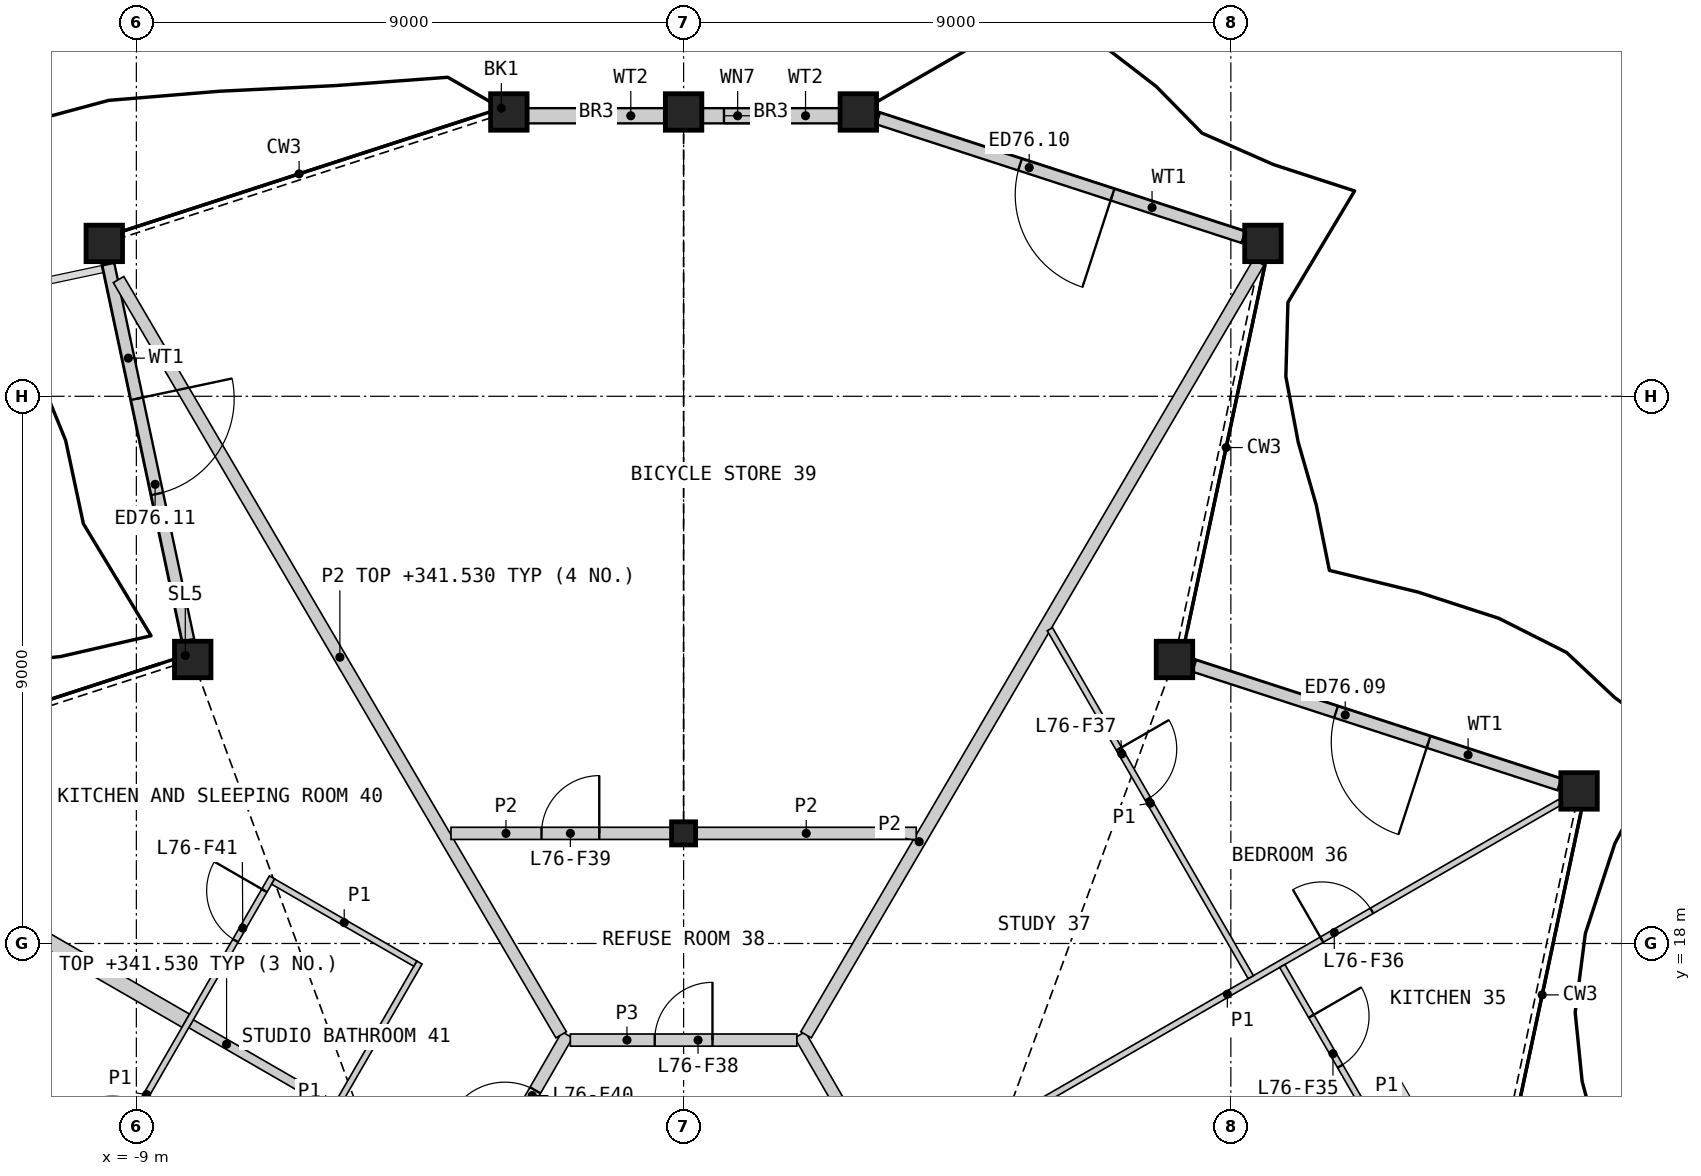
"""IFC4 building model, lengths in metres.
Left out: names, types, materials, properties, quantities, classifications, styles, units other than length and angle.
Written with IfcOpenShell. Run it as: python <this file> out.ifc"""

import sys

from ifc_helpers import new_model, si_unit, direction, frame, frame_2d, origin, origin_2d, place, context, subcontext, project, spatial, rectangle, hollow_rectangle, i_section, extrude, element, fill, save


model = new_model("IFC4")
c1 = context("Model", 3, precision=1e-05, world=origin(), true_north=direction((0.0, 1.0)))
c2 = subcontext(c1, "Body", "Model", "MODEL_VIEW")
j1 = project(units=[si_unit("LENGTHUNIT", "METRE"), si_unit("PLANEANGLEUNIT", "RADIAN")], contexts=[c1])
p1 = place(None, origin())
s1 = spatial("IfcSite", under=j1, at=p1, CompositionType="ELEMENT")
p2 = place(p1, origin())
s2 = spatial("IfcBuilding", under=s1, at=p2, CompositionType="ELEMENT")
p3 = place(p2, frame((0.0, 0.0, 339.2)))
s3 = spatial("IfcBuildingStorey", under=s2, at=p3, CompositionType="ELEMENT", Elevation=339.2)
for number, where, z_axis, x_axis in (
    (1, (14.727, 20.509, 0.0), (0.0, 0.0, 1.0), (1.0, 0.0, 0.0)),
    (2, (8.073, 22.671, 0.0), (0.0, 0.0, 1.0), (1.0, 0.0, 0.0)),
    (3, (9.527, 29.514, 0.0), (0.0, 0.0, 1.0), (1.0, 0.0, 0.0)),
    (4, (2.874, 31.676, 0.0), (0.0, 0.0, 1.0), (1.0, 0.0, 0.0)),
    (5, (0.0, 31.676, 0.0), (0.0, 0.0, 1.0), (1.0, 0.0, 0.0)),
    (6, (-2.874, 31.676, 0.0), (0.0, 0.0, 1.0), (1.0, 0.0, 0.0)),
    (7, (-9.527, 29.514, 0.0), (0.0, 0.0, 1.0), (1.0, 0.0, 0.0)),
    (8, (-8.073, 22.671, 0.0), (0.0, 0.0, 1.0), (1.0, 0.0, 0.0)),
):
    element("IfcColumn", number, at=place(p3, frame(where, z_axis=z_axis, x_axis=x_axis)), inside=s3, PredefinedType="COLUMN", context=c2, shape_type="SweptSolid", body=[
        extrude(hollow_rectangle(XDim=0.6, YDim=0.6, WallThickness=0.04, at=origin_2d()), origin(), (0.0, 0.0, 1.0), 3.4),
    ])
p4 = place(p3, frame((0.0, 19.811, 0.0), z_axis=(0.0, 0.0, 1.0), x_axis=(1.0, 0.0, 0.0)))
e9 = element("IfcColumn", 9, at=p4, inside=s3, PredefinedType="COLUMN", context=c2, shape_type="SweptSolid", body=[
    extrude(i_section(OverallWidth=0.396, OverallDepth=0.381, WebThickness=0.019, FlangeThickness=0.03, at=origin_2d()), origin(), (0.0, 0.0, 1.0), 3.4),
])
p5 = place(p3, frame((14.403, 20.614, 0.0), z_axis=(0.0, 0.0, 1.0), x_axis=(-0.951053103012, 0.309027499182, 0.0)))
e10 = element("IfcWall", 10, at=p5, inside=s3, PredefinedType="SOLIDWALL", context=c2, shape_type="SweptSolid", body=[
    extrude(rectangle(XDim=6.315, YDim=0.2, at=frame_2d((3.157, 0.0))), origin(), (0.0, 0.0, 1.0), 2.488),
])
p6 = place(p5, frame((2.263, 0.0, 0.0)))
e11 = element("IfcOpeningElement", 11, at=p6, cuts=e10, PredefinedType="OPENING", context=c2, shape_type="SweptSolid", body=[
    extrude(rectangle(XDim=1.6, YDim=2.25, at=frame_2d((0.8, 1.125))), frame((0.0, 0.11, 0.0), z_axis=(0.0, -1.0, 0.0), x_axis=(1.0, 0.0, 0.0)), (0.0, 0.0, 1.0), 0.22),
])
p7 = place(p3, frame((9.206, 29.616, 0.0), z_axis=(0.0, 0.0, 1.0), x_axis=(-0.951056221468, 0.309017901757, 0.0)))
e12 = element("IfcWall", 12, at=p7, inside=s3, PredefinedType="SOLIDWALL", context=c2, shape_type="SweptSolid", body=[
    extrude(rectangle(XDim=6.316, YDim=0.2, at=frame_2d((3.158, 0.0))), origin(), (0.0, 0.0, 1.0), 2.488),
])
p8 = place(p7, frame((2.263, 0.0, 0.0)))
e13 = element("IfcOpeningElement", 13, at=p8, cuts=e12, PredefinedType="OPENING", context=c2, shape_type="SweptSolid", body=[
    extrude(rectangle(XDim=1.6, YDim=2.25, at=frame_2d((0.8, 1.125))), frame((0.0, 0.11, 0.0), z_axis=(0.0, -1.0, 0.0), x_axis=(1.0, 0.0, 0.0)), (0.0, 0.0, 1.0), 0.22),
])
p9 = place(p3, frame((2.574, 31.614, 0.0), z_axis=(0.0, 0.0, 1.0), x_axis=(-1.0, 0.0, 0.0)))
e14 = element("IfcWall", 14, at=p9, inside=s3, PredefinedType="SOLIDWALL", context=c2, shape_type="SweptSolid", body=[
    extrude(rectangle(XDim=2.274, YDim=0.25, at=frame_2d((1.137, 0.0))), origin(), (0.0, 0.0, 1.0), 2.488),
])
p10 = place(p9, frame((1.01, 0.0, 1.6)))
e15 = element("IfcOpeningElement", 15, at=p10, cuts=e14, PredefinedType="OPENING", context=c2, shape_type="SweptSolid", body=[
    extrude(rectangle(XDim=0.9, YDim=0.6, at=frame_2d((0.45, 0.3))), frame((0.0, 0.135, 0.0), z_axis=(0.0, -1.0, 0.0), x_axis=(1.0, 0.0, 0.0)), (0.0, 0.0, 1.0), 0.27),
])
p11 = place(p3, frame((-0.3, 31.614, 0.0), z_axis=(0.0, 0.0, 1.0), x_axis=(-1.0, 0.0, 0.0)))
e16 = element("IfcWall", 16, at=p11, inside=s3, PredefinedType="SOLIDWALL", context=c2, shape_type="SweptSolid", body=[
    extrude(rectangle(XDim=2.274, YDim=0.25, at=frame_2d((1.137, 0.0))), origin(), (0.0, 0.0, 1.0), 2.488),
])
p12 = place(p3, frame((-9.461, 29.174, 0.0), z_axis=(0.0, 0.0, 1.0), x_axis=(0.20791277238, -0.97814737084, 0.0)))
e17 = element("IfcWall", 17, at=p12, inside=s3, PredefinedType="SOLIDWALL", context=c2, shape_type="SweptSolid", body=[
    extrude(rectangle(XDim=6.324, YDim=0.2, at=frame_2d((3.162, 0.0))), origin(), (0.0, 0.0, 1.0), 2.488),
])
p13 = place(p12, frame((2.263, 0.0, 0.0)))
e18 = element("IfcOpeningElement", 18, at=p13, cuts=e17, PredefinedType="OPENING", context=c2, shape_type="SweptSolid", body=[
    extrude(rectangle(XDim=1.6, YDim=2.25, at=frame_2d((0.8, 1.125))), frame((0.0, 0.11, 0.0), z_axis=(0.0, -1.0, 0.0), x_axis=(1.0, 0.0, 0.0)), (0.0, 0.0, 1.0), 0.22),
])
p14 = place(p3, frame((-14.417, 20.327, 0.0), z_axis=(0.0, 0.0, 1.0), x_axis=(0.866018271907, -0.50001235257, 0.0)))
e19 = element("IfcWall", 19, at=p14, inside=s3, PredefinedType="PARTITIONING", context=c2, shape_type="SweptSolid", body=[
    extrude(rectangle(XDim=7.193, YDim=0.25, at=frame_2d((3.596, 0.0))), origin(), (0.0, 0.0, 1.0), 2.33),
])
p15 = place(p3, frame((-4.169, 12.59, 0.0), z_axis=(0.0, 0.0, 1.0), x_axis=(0.499950370306, 0.866054055606, 0.0)))
e20 = element("IfcWall", 20, at=p15, inside=s3, PredefinedType="PARTITIONING", context=c2, shape_type="SweptSolid", body=[
    extrude(rectangle(XDim=4.513, YDim=0.2, at=frame_2d((2.256, 0.0))), origin(), (0.0, 0.0, 1.0), 3.1),
])
p16 = place(p15, frame((2.459, 0.0, 0.0)))
e21 = element("IfcOpeningElement", 21, at=p16, cuts=e20, PredefinedType="OPENING", context=c2, shape_type="SweptSolid", body=[
    extrude(rectangle(XDim=1.0, YDim=2.1, at=frame_2d((0.5, 1.05))), frame((0.0, 0.11, 0.0), z_axis=(0.0, -1.0, 0.0), x_axis=(1.0, 0.0, 0.0)), (0.0, 0.0, 1.0), 0.22),
])
p17 = place(p3, frame((1.913, 16.498, 0.0), z_axis=(0.0, 0.0, 1.0), x_axis=(0.499950370306, -0.866054055606, 0.0)))
e22 = element("IfcWall", 22, at=p17, inside=s3, PredefinedType="PARTITIONING", context=c2, shape_type="SweptSolid", body=[
    extrude(rectangle(XDim=4.513, YDim=0.2, at=frame_2d((2.256, 0.0))), origin(), (0.0, 0.0, 1.0), 3.1),
])
p18 = place(p3, frame((-1.863, 16.411, 0.0), z_axis=(0.0, 0.0, 1.0), x_axis=(1.0, 0.0, 0.0)))
e23 = element("IfcWall", 23, at=p18, inside=s3, PredefinedType="PARTITIONING", context=c2, shape_type="SweptSolid", body=[
    extrude(rectangle(XDim=3.726, YDim=0.2, at=frame_2d((1.863, 0.0))), origin(), (0.0, 0.0, 1.0), 3.1),
])
p19 = place(p18, frame((1.388, 0.0, 0.0)))
e24 = element("IfcOpeningElement", 24, at=p19, cuts=e23, PredefinedType="OPENING", context=c2, shape_type="SweptSolid", body=[
    extrude(rectangle(XDim=0.95, YDim=2.1, at=frame_2d((0.475, 1.05))), frame((0.0, 0.11, 0.0), z_axis=(0.0, -1.0, 0.0), x_axis=(1.0, 0.0, 0.0)), (0.0, 0.0, 1.0), 0.22),
])
p20 = place(p3, frame((-9.292, 28.919, 0.0), z_axis=(0.0, 0.0, 1.0), x_axis=(0.505558038556, -0.862792599442, 0.0)))
e25 = element("IfcWall", 25, at=p20, inside=s3, PredefinedType="PARTITIONING", context=c2, shape_type="SweptSolid", body=[
    extrude(rectangle(XDim=14.397, YDim=0.2, at=frame_2d((7.199, 0.0))), origin(), (0.0, 0.0, 1.0), 2.33),
])
p21 = place(p3, frame((2.014, 16.497, 0.0), z_axis=(0.0, 0.0, 1.0), x_axis=(0.5055676136, 0.862786988821, 0.0)))
e26 = element("IfcWall", 26, at=p21, inside=s3, PredefinedType="PARTITIONING", context=c2, shape_type="SweptSolid", body=[
    extrude(rectangle(XDim=14.728, YDim=0.2, at=frame_2d((7.364, 0.0))), origin(), (0.0, 0.0, 1.0), 2.33),
])
p22 = place(p3, frame((-3.826, 19.811, 0.0), z_axis=(0.0, 0.0, 1.0), x_axis=(1.0, 0.0, 0.0)))
e27 = element("IfcWall", 27, at=p22, inside=s3, PredefinedType="PARTITIONING", context=c2, shape_type="SweptSolid", body=[
    extrude(rectangle(XDim=3.618, YDim=0.2, at=frame_2d((1.809, 0.0))), origin(), (0.0, 0.0, 1.0), 2.33),
])
p23 = place(p22, frame((1.489, 0.0, 0.0)))
e28 = element("IfcOpeningElement", 28, at=p23, cuts=e27, PredefinedType="OPENING", context=c2, shape_type="SweptSolid", body=[
    extrude(rectangle(XDim=0.95, YDim=2.1, at=frame_2d((0.475, 1.05))), frame((0.0, 0.11, 0.0), z_axis=(0.0, -1.0, 0.0), x_axis=(1.0, 0.0, 0.0)), (0.0, 0.0, 1.0), 0.22),
])
p24 = place(p3, frame((0.208, 19.811, 0.0), z_axis=(0.0, 0.0, 1.0), x_axis=(1.0, 0.0, 0.0)))
e29 = element("IfcWall", 29, at=p24, inside=s3, PredefinedType="PARTITIONING", context=c2, shape_type="SweptSolid", body=[
    extrude(rectangle(XDim=3.618, YDim=0.2, at=frame_2d((1.809, 0.0))), origin(), (0.0, 0.0, 1.0), 2.33),
])
p25 = place(p3, frame((-8.101, 16.68, 0.0), z_axis=(0.0, 0.0, 1.0), x_axis=(0.866019956843, -0.50000943426, 0.0)))
e30 = element("IfcWall", 30, at=p25, inside=s3, PredefinedType="PLUMBINGWALL", context=c2, shape_type="SweptSolid", body=[
    extrude(rectangle(XDim=2.7, YDim=0.15, at=frame_2d((1.35, 0.0))), origin(), (0.0, 0.0, 1.0), 2.33),
])
p26 = place(p3, frame((3.468, 14.005, 0.0), z_axis=(0.0, 0.0, 1.0), x_axis=(0.866020616849, 0.500008291124, 0.0)))
e31 = element("IfcWall", 31, at=p26, inside=s3, PredefinedType="PARTITIONING", context=c2, shape_type="SweptSolid", body=[
    extrude(rectangle(XDim=12.643, YDim=0.1, at=frame_2d((6.321, 0.0))), origin(), (0.0, 0.0, 1.0), 2.33),
])
p27 = place(p26, frame((8.115, 0.0, 0.0)))
e32 = element("IfcOpeningElement", 32, at=p27, cuts=e31, PredefinedType="OPENING", context=c2, shape_type="SweptSolid", body=[
    extrude(rectangle(XDim=0.95, YDim=2.1, at=frame_2d((0.475, 1.05))), frame((0.0, 0.06, 0.0), z_axis=(0.0, -1.0, 0.0), x_axis=(1.0, 0.0, 0.0)), (0.0, 0.0, 1.0), 0.12),
])
p28 = place(p3, frame((9.846, 17.63, 0.0), z_axis=(0.0, 0.0, 1.0), x_axis=(0.500013259472, -0.866017748289, 0.0)))
e33 = element("IfcWall", 33, at=p28, inside=s3, PredefinedType="PARTITIONING", context=c2, shape_type="SweptSolid", body=[
    extrude(rectangle(XDim=10.295, YDim=0.1, at=frame_2d((5.147, 0.0))), origin(), (0.0, 0.0, 1.0), 2.33),
])
p29 = place(p28, frame((7.286, 0.0, 0.0)))
e34 = element("IfcOpeningElement", 34, at=p29, cuts=e33, PredefinedType="OPENING", context=c2, shape_type="SweptSolid", body=[
    extrude(rectangle(XDim=0.95, YDim=2.1, at=frame_2d((0.475, 1.05))), frame((0.0, 0.06, 0.0), z_axis=(0.0, -1.0, 0.0), x_axis=(1.0, 0.0, 0.0)), (0.0, 0.0, 1.0), 0.12),
])
p30 = place(p28, frame((0.954, 0.0, 0.0)))
e35 = element("IfcOpeningElement", 35, at=p30, cuts=e33, PredefinedType="OPENING", context=c2, shape_type="SweptSolid", body=[
    extrude(rectangle(XDim=0.95, YDim=2.1, at=frame_2d((0.475, 1.05))), frame((0.0, 0.06, 0.0), z_axis=(0.0, -1.0, 0.0), x_axis=(1.0, 0.0, 0.0)), (0.0, 0.0, 1.0), 0.12),
])
p31 = place(p3, frame((6.024, 23.169, 0.0), z_axis=(0.0, 0.0, 1.0), x_axis=(0.499997497522, -0.866026848586, 0.0)))
e36 = element("IfcWall", 36, at=p31, inside=s3, PredefinedType="PARTITIONING", context=c2, shape_type="SweptSolid", body=[
    extrude(rectangle(XDim=6.608, YDim=0.1, at=frame_2d((3.304, 0.0))), origin(), (0.0, 0.0, 1.0), 2.33),
])
p32 = place(p31, frame((2.273, 0.0, 0.0)))
e37 = element("IfcOpeningElement", 37, at=p32, cuts=e36, PredefinedType="OPENING", context=c2, shape_type="SweptSolid", body=[
    extrude(rectangle(XDim=0.95, YDim=2.1, at=frame_2d((0.475, 1.05))), frame((0.0, 0.06, 0.0), z_axis=(0.0, -1.0, 0.0), x_axis=(1.0, 0.0, 0.0)), (0.0, 0.0, 1.0), 0.12),
])
p33 = place(p3, frame((-7.094, 12.924, 0.0), z_axis=(0.0, 0.0, 1.0), x_axis=(0.499996545922, 0.866027397988, 0.0)))
e38 = element("IfcWall", 38, at=p33, inside=s3, PredefinedType="PARTITIONING", context=c2, shape_type="SweptSolid", body=[
    extrude(rectangle(XDim=5.5, YDim=0.1, at=frame_2d((2.75, 0.0))), origin(), (0.0, 0.0, 1.0), 2.33),
])
p34 = place(p3, frame((-9.519, 14.323, 0.0), z_axis=(0.0, 0.0, 1.0), x_axis=(0.499996545922, 0.866027397988, 0.0)))
e39 = element("IfcWall", 39, at=p34, inside=s3, PredefinedType="PARTITIONING", context=c2, shape_type="SweptSolid", body=[
    extrude(rectangle(XDim=5.5, YDim=0.1, at=frame_2d((2.75, 0.0))), origin(), (0.0, 0.0, 1.0), 2.33),
])
p35 = place(p34, frame((4.3, 0.0, 0.0)))
e40 = element("IfcOpeningElement", 40, at=p35, cuts=e39, PredefinedType="OPENING", context=c2, shape_type="SweptSolid", body=[
    extrude(rectangle(XDim=0.95, YDim=2.1, at=frame_2d((0.475, 1.05))), frame((0.0, 0.06, 0.0), z_axis=(0.0, -1.0, 0.0), x_axis=(1.0, 0.0, 0.0)), (0.0, 0.0, 1.0), 0.12),
])
p36 = place(p34, frame((0.25, 0.0, 0.0)))
e41 = element("IfcOpeningElement", 41, at=p36, cuts=e39, PredefinedType="OPENING", context=c2, shape_type="SweptSolid", body=[
    extrude(rectangle(XDim=0.95, YDim=2.1, at=frame_2d((0.475, 1.05))), frame((0.0, 0.06, 0.0), z_axis=(0.0, -1.0, 0.0), x_axis=(1.0, 0.0, 0.0)), (0.0, 0.0, 1.0), 0.12),
])
p37 = place(p3, frame((-6.751, 19.018, 0.0), z_axis=(0.0, 0.0, 1.0), x_axis=(0.866036505625, -0.499980770555, 0.0)))
e42 = element("IfcWall", 42, at=p37, inside=s3, PredefinedType="PARTITIONING", context=c2, shape_type="SweptSolid", body=[
    extrude(rectangle(XDim=2.7, YDim=0.1, at=frame_2d((1.35, 0.0))), origin(), (0.0, 0.0, 1.0), 2.33),
])
p38 = place(p6, origin())
e43 = element("IfcDoor", 43, at=p38, inside=s3, OperationType="DOUBLE_DOOR_SINGLE_SWING", PredefinedType="DOOR", context=c2, shape_type="SweptSolid", body=[
    extrude(rectangle(XDim=1.6, YDim=2.25, at=frame_2d((0.8, 1.125))), frame((0.0, 0.025, 0.0), z_axis=(0.0, -1.0, 0.0), x_axis=(1.0, 0.0, 0.0)), (0.0, 0.0, 1.0), 0.05),
])
fill(e11, e43)
p39 = place(p8, origin())
e44 = element("IfcDoor", 44, at=p39, inside=s3, OperationType="DOUBLE_DOOR_SINGLE_SWING", PredefinedType="DOOR", context=c2, shape_type="SweptSolid", body=[
    extrude(rectangle(XDim=1.6, YDim=2.25, at=frame_2d((0.8, 1.125))), frame((0.0, 0.025, 0.0), z_axis=(0.0, -1.0, 0.0), x_axis=(1.0, 0.0, 0.0)), (0.0, 0.0, 1.0), 0.05),
])
fill(e13, e44)
p40 = place(p10, origin())
e45 = element("IfcWindow", 45, at=p40, inside=s3, PartitioningType="SINGLE_PANEL", PredefinedType="WINDOW", context=c2, shape_type="SweptSolid", body=[
    extrude(rectangle(XDim=0.9, YDim=0.6, at=frame_2d((0.45, 0.3))), frame((0.0, 0.03, 0.0), z_axis=(0.0, -1.0, 0.0), x_axis=(1.0, 0.0, 0.0)), (0.0, 0.0, 1.0), 0.06),
])
fill(e15, e45)
p41 = place(p13, origin())
e46 = element("IfcDoor", 46, at=p41, inside=s3, OperationType="DOUBLE_DOOR_SINGLE_SWING", PredefinedType="DOOR", context=c2, shape_type="SweptSolid", body=[
    extrude(rectangle(XDim=1.6, YDim=2.25, at=frame_2d((0.8, 1.125))), frame((0.0, 0.025, 0.0), z_axis=(0.0, -1.0, 0.0), x_axis=(1.0, 0.0, 0.0)), (0.0, 0.0, 1.0), 0.05),
])
fill(e18, e46)
p42 = place(p30, origin())
e47 = element("IfcDoor", 47, at=p42, inside=s3, OperationType="SINGLE_SWING_LEFT", PredefinedType="DOOR", context=c2, shape_type="SweptSolid", body=[
    extrude(rectangle(XDim=0.95, YDim=2.1, at=frame_2d((0.475, 1.05))), frame((0.0, 0.025, 0.0), z_axis=(0.0, -1.0, 0.0), x_axis=(1.0, 0.0, 0.0)), (0.0, 0.0, 1.0), 0.05),
])
fill(e35, e47)
p43 = place(p27, origin())
e48 = element("IfcDoor", 48, at=p43, inside=s3, OperationType="SINGLE_SWING_LEFT", PredefinedType="DOOR", context=c2, shape_type="SweptSolid", body=[
    extrude(rectangle(XDim=0.95, YDim=2.1, at=frame_2d((0.475, 1.05))), frame((0.0, 0.025, 0.0), z_axis=(0.0, -1.0, 0.0), x_axis=(1.0, 0.0, 0.0)), (0.0, 0.0, 1.0), 0.05),
])
fill(e32, e48)
p44 = place(p32, origin())
e49 = element("IfcDoor", 49, at=p44, inside=s3, OperationType="SINGLE_SWING_LEFT", PredefinedType="DOOR", context=c2, shape_type="SweptSolid", body=[
    extrude(rectangle(XDim=0.95, YDim=2.1, at=frame_2d((0.475, 1.05))), frame((0.0, 0.025, 0.0), z_axis=(0.0, -1.0, 0.0), x_axis=(1.0, 0.0, 0.0)), (0.0, 0.0, 1.0), 0.05),
])
fill(e37, e49)
p45 = place(p19, origin())
e50 = element("IfcDoor", 50, at=p45, inside=s3, OperationType="SINGLE_SWING_RIGHT", PredefinedType="DOOR", context=c2, shape_type="SweptSolid", body=[
    extrude(rectangle(XDim=0.95, YDim=2.1, at=frame_2d((0.475, 1.05))), frame((0.0, 0.025, 0.0), z_axis=(0.0, -1.0, 0.0), x_axis=(1.0, 0.0, 0.0)), (0.0, 0.0, 1.0), 0.05),
])
fill(e24, e50)
p46 = place(p23, origin())
e51 = element("IfcDoor", 51, at=p46, inside=s3, OperationType="SINGLE_SWING_RIGHT", PredefinedType="DOOR", context=c2, shape_type="SweptSolid", body=[
    extrude(rectangle(XDim=0.95, YDim=2.1, at=frame_2d((0.475, 1.05))), frame((0.0, 0.025, 0.0), z_axis=(0.0, -1.0, 0.0), x_axis=(1.0, 0.0, 0.0)), (0.0, 0.0, 1.0), 0.05),
])
fill(e28, e51)
p47 = place(p16, origin())
e52 = element("IfcDoor", 52, at=p47, inside=s3, OperationType="SINGLE_SWING_LEFT", PredefinedType="DOOR", context=c2, shape_type="SweptSolid", body=[
    extrude(rectangle(XDim=1.0, YDim=2.1, at=frame_2d((0.5, 1.05))), frame((0.0, 0.025, 0.0), z_axis=(0.0, -1.0, 0.0), x_axis=(1.0, 0.0, 0.0)), (0.0, 0.0, 1.0), 0.05),
])
fill(e21, e52)
p48 = place(p35, origin())
e53 = element("IfcDoor", 53, at=p48, inside=s3, OperationType="SINGLE_SWING_RIGHT", PredefinedType="DOOR", context=c2, shape_type="SweptSolid", body=[
    extrude(rectangle(XDim=0.95, YDim=2.1, at=frame_2d((0.475, 1.05))), frame((0.0, 0.025, 0.0), z_axis=(0.0, -1.0, 0.0), x_axis=(1.0, 0.0, 0.0)), (0.0, 0.0, 1.0), 0.05),
])
fill(e40, e53)
save(model, sys.argv[1])
